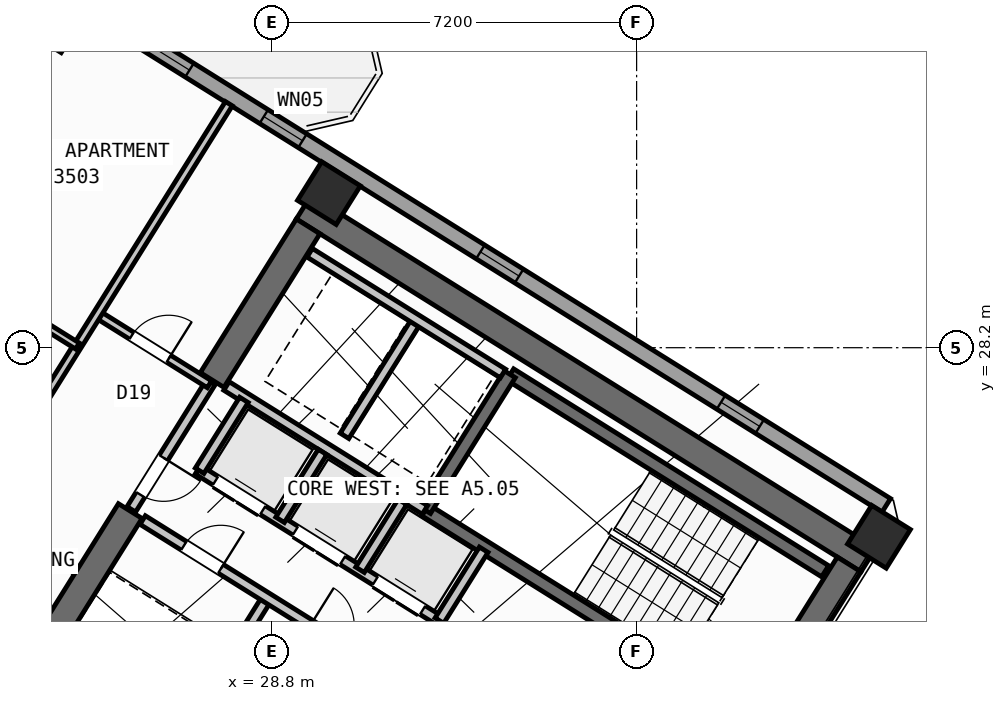
"""IFC4 building model, lengths in metres.
Left out: names, types, materials, properties, quantities, classifications, styles, units other than length and angle.
Written with IfcOpenShell. Run it as: python <this file> out.ifc"""

import sys

from ifc_helpers import new_model, si_unit, direction, frame, frame_2d, origin, origin_2d, place, context, subcontext, project, spatial, rectangle, hollow_rectangle, extrude, source, transform, mapped, element, fill, save


model = new_model("IFC4")
c1 = context("Model", 3, precision=1e-05, world=origin(), true_north=direction((0.0, 1.0)))
c2 = subcontext(c1, "Body", "Model", "MODEL_VIEW")
j1 = project(units=[si_unit("LENGTHUNIT", "METRE"), si_unit("PLANEANGLEUNIT", "RADIAN")], contexts=[c1])
p1 = place(None, origin())
s1 = spatial("IfcSite", under=j1, at=p1, CompositionType="ELEMENT")
p2 = place(p1, origin())
s2 = spatial("IfcBuilding", under=s1, at=p2, CompositionType="ELEMENT")
p3 = place(p2, frame((0.0, 0.0, 140.7)))
s3 = spatial("IfcBuildingStorey", under=s2, at=p3, CompositionType="ELEMENT", Elevation=140.7)
p4 = place(p3, frame((40.573, 24.01, 0.0), z_axis=(0.0, 0.0, 1.0), x_axis=(-0.848047359947, 0.529920442413, 0.0)))
e1 = element("IfcWall", 1, at=p4, inside=s3, PredefinedType="SHEAR", context=c2, shape_type="SweptSolid", body=[
    extrude(rectangle(XDim=13.14, YDim=0.55, at=frame_2d((6.57, 0.0))), origin(), (0.0, 0.0, 1.0), 3.35),
])
p5 = place(p3, frame((40.194, 23.922, 0.0), z_axis=(0.0, 0.0, 1.0), x_axis=(-0.529888438328, -0.848067357541, 0.0)))
e2 = element("IfcWall", 2, at=p5, inside=s3, PredefinedType="SHEAR", context=c2, shape_type="SweptSolid", body=[
    extrude(rectangle(XDim=3.575, YDim=0.55, at=frame_2d((1.788, 0.0))), origin(), (0.0, 0.0, 1.0), 3.35),
])
p6 = place(p3, frame((29.517, 30.594, 0.0), z_axis=(0.0, 0.0, 1.0), x_axis=(-0.529906864564, -0.848055844204, 0.0)))
e3 = element("IfcWall", 3, at=p6, inside=s3, PredefinedType="SHEAR", context=c2, shape_type="SweptSolid", body=[
    extrude(rectangle(XDim=3.575, YDim=0.55, at=frame_2d((1.788, 0.0))), origin(), (0.0, 0.0, 1.0), 3.35),
])
p7 = place(p3, frame((26.007, 24.976, 0.0), z_axis=(0.0, 0.0, 1.0), x_axis=(-0.529923795287, -0.848045264823, 0.0)))
e4 = element("IfcWall", 4, at=p7, inside=s3, PredefinedType="SHEAR", context=c2, shape_type="SweptSolid", body=[
    extrude(rectangle(XDim=6.425, YDim=0.55, at=frame_2d((3.212, 0.0))), origin(), (0.0, 0.0, 1.0), 3.35),
])
m1 = source(origin(), c2, "Body", "SweptSolid", [
    extrude(hollow_rectangle(XDim=0.9, YDim=0.9, WallThickness=0.036, at=origin_2d()), origin(), (0.0, 0.0, 1.0), 3.6),
])
for number, where, z_axis, x_axis in (
    (5, (40.783, 24.469, 0.0), (0.0, 0.0, 1.0), (-0.848, 0.53, 0.0)),
    (6, (29.928, 31.251, 0.0), (0.0, 0.0, 1.0), (-0.848, 0.53, 0.0)),
    (7, (24.5, 34.643, 0.0), (0.0, 0.0, 1.0), (-0.848, 0.53, 0.0)),
):
    element("IfcColumn", number, at=place(p3, frame(where, z_axis=z_axis, x_axis=x_axis)), inside=s3, PredefinedType="COLUMN", context=c2, shape_type="MappedRepresentation", body=[
        mapped(m1, transform((0.0, 0.0, 0.0), scale=1.0)),
    ])
p8 = place(p3, frame((29.268, 6.429, 0.0), z_axis=(0.0, 0.0, 1.0), x_axis=(-0.848049971435, 0.529916263149, 0.0)))
e8 = element("IfcWall", 8, at=p8, inside=s3, PredefinedType="STANDARD", context=c2, shape_type="SweptSolid", body=[
    extrude(rectangle(XDim=31.588, YDim=0.32, at=frame_2d((15.794, 0.0))), origin(), (0.0, 0.0, 1.0), 3.35),
])
p9 = place(p8, frame((16.362, 0.0, 0.0)))
e9 = element("IfcOpeningElement", 9, at=p9, cuts=e8, PredefinedType="OPENING", context=c2, shape_type="SweptSolid", body=[
    extrude(rectangle(XDim=1.2, YDim=2.15, at=frame_2d((0.6, 1.075))), frame((0.0, 0.17, 0.0), z_axis=(0.0, -1.0, 0.0), x_axis=(1.0, 0.0, 0.0)), (0.0, 0.0, 1.0), 0.34),
])
p10 = place(p8, frame((2.989, 0.0, 0.8)))
e10 = element("IfcOpeningElement", 10, at=p10, cuts=e8, PredefinedType="OPENING", context=c2, shape_type="SweptSolid", body=[
    extrude(rectangle(XDim=2.1, YDim=1.55, at=frame_2d((1.05, 0.775))), frame((0.0, 0.17, 0.0), z_axis=(0.0, -1.0, 0.0), x_axis=(1.0, 0.0, 0.0)), (0.0, 0.0, 1.0), 0.34),
])
p11 = place(p8, frame((8.359, 0.0, 0.8)))
e11 = element("IfcOpeningElement", 11, at=p11, cuts=e8, PredefinedType="OPENING", context=c2, shape_type="SweptSolid", body=[
    extrude(rectangle(XDim=2.1, YDim=1.55, at=frame_2d((1.05, 0.775))), frame((0.0, 0.17, 0.0), z_axis=(0.0, -1.0, 0.0), x_axis=(1.0, 0.0, 0.0)), (0.0, 0.0, 1.0), 0.34),
])
p12 = place(p8, frame((13.284, 0.0, 0.95)))
e12 = element("IfcOpeningElement", 12, at=p12, cuts=e8, PredefinedType="OPENING", context=c2, shape_type="SweptSolid", body=[
    extrude(rectangle(XDim=1.2, YDim=1.4, at=frame_2d((0.6, 0.7))), frame((0.0, 0.17, 0.0), z_axis=(0.0, -1.0, 0.0), x_axis=(1.0, 0.0, 0.0)), (0.0, 0.0, 1.0), 0.34),
])
p13 = place(p8, frame((29.188, 0.0, 0.95)))
e13 = element("IfcOpeningElement", 13, at=p13, cuts=e8, PredefinedType="OPENING", context=c2, shape_type="SweptSolid", body=[
    extrude(rectangle(XDim=1.2, YDim=1.4, at=frame_2d((0.6, 0.7))), frame((0.0, 0.17, 0.0), z_axis=(0.0, -1.0, 0.0), x_axis=(1.0, 0.0, 0.0)), (0.0, 0.0, 1.0), 0.34),
])
p14 = place(p8, frame((19.674, 0.0, 1.0)))
e14 = element("IfcOpeningElement", 14, at=p14, cuts=e8, PredefinedType="OPENING", context=c2, shape_type="SweptSolid", body=[
    extrude(rectangle(XDim=0.9, YDim=1.25, at=frame_2d((0.45, 0.625))), frame((0.0, 0.17, 0.0), z_axis=(0.0, -1.0, 0.0), x_axis=(1.0, 0.0, 0.0)), (0.0, 0.0, 1.0), 0.34),
])
p15 = place(p8, frame((21.896, 0.0, 1.0)))
e15 = element("IfcOpeningElement", 15, at=p15, cuts=e8, PredefinedType="OPENING", context=c2, shape_type="SweptSolid", body=[
    extrude(rectangle(XDim=0.9, YDim=1.25, at=frame_2d((0.45, 0.625))), frame((0.0, 0.17, 0.0), z_axis=(0.0, -1.0, 0.0), x_axis=(1.0, 0.0, 0.0)), (0.0, 0.0, 1.0), 0.34),
])
p16 = place(p8, frame((24.106, 0.0, 1.0)))
e16 = element("IfcOpeningElement", 16, at=p16, cuts=e8, PredefinedType="OPENING", context=c2, shape_type="SweptSolid", body=[
    extrude(rectangle(XDim=0.65, YDim=1.15, at=frame_2d((0.325, 0.575))), frame((0.0, 0.17, 0.0), z_axis=(0.0, -1.0, 0.0), x_axis=(1.0, 0.0, 0.0)), (0.0, 0.0, 1.0), 0.34),
])
p17 = place(p8, frame((26.366, 0.0, 1.0)))
e17 = element("IfcOpeningElement", 17, at=p17, cuts=e8, PredefinedType="OPENING", context=c2, shape_type="SweptSolid", body=[
    extrude(rectangle(XDim=0.9, YDim=1.25, at=frame_2d((0.45, 0.625))), frame((0.0, 0.17, 0.0), z_axis=(0.0, -1.0, 0.0), x_axis=(1.0, 0.0, 0.0)), (0.0, 0.0, 1.0), 0.34),
])
p18 = place(p3, frame((14.138, 41.825, 0.0), z_axis=(0.0, 0.0, 1.0), x_axis=(0.848046498049, -0.529921821731, 0.0)))
e18 = element("IfcWall", 18, at=p18, inside=s3, PredefinedType="STANDARD", context=c2, shape_type="SweptSolid", body=[
    extrude(rectangle(XDim=31.588, YDim=0.32, at=frame_2d((15.794, 0.0))), origin(), (0.0, 0.0, 1.0), 3.35),
])
p19 = place(p18, frame((2.949, 0.0, 0.0)))
e19 = element("IfcOpeningElement", 19, at=p19, cuts=e18, PredefinedType="OPENING", context=c2, shape_type="SweptSolid", body=[
    extrude(rectangle(XDim=1.05, YDim=2.15, at=frame_2d((0.525, 1.075))), frame((0.0, 0.17, 0.0), z_axis=(0.0, -1.0, 0.0), x_axis=(1.0, 0.0, 0.0)), (0.0, 0.0, 1.0), 0.34),
])
p20 = place(p18, frame((0.861, 0.0, 0.85)))
e20 = element("IfcOpeningElement", 20, at=p20, cuts=e18, PredefinedType="OPENING", context=c2, shape_type="SweptSolid", body=[
    extrude(rectangle(XDim=1.5, YDim=1.5, at=frame_2d((0.75, 0.75))), frame((0.0, 0.17, 0.0), z_axis=(0.0, -1.0, 0.0), x_axis=(1.0, 0.0, 0.0)), (0.0, 0.0, 1.0), 0.34),
])
p21 = place(p18, frame((8.494, 0.0, 0.85)))
e21 = element("IfcOpeningElement", 21, at=p21, cuts=e18, PredefinedType="OPENING", context=c2, shape_type="SweptSolid", body=[
    extrude(rectangle(XDim=1.8, YDim=1.5, at=frame_2d((0.9, 0.75))), frame((0.0, 0.17, 0.0), z_axis=(0.0, -1.0, 0.0), x_axis=(1.0, 0.0, 0.0)), (0.0, 0.0, 1.0), 0.34),
])
p22 = place(p18, frame((13.874, 0.0, 0.85)))
e22 = element("IfcOpeningElement", 22, at=p22, cuts=e18, PredefinedType="OPENING", context=c2, shape_type="SweptSolid", body=[
    extrude(rectangle(XDim=1.5, YDim=1.5, at=frame_2d((0.75, 0.75))), frame((0.0, 0.17, 0.0), z_axis=(0.0, -1.0, 0.0), x_axis=(1.0, 0.0, 0.0)), (0.0, 0.0, 1.0), 0.34),
])
p23 = place(p18, frame((17.104, 0.0, 1.0)))
e23 = element("IfcOpeningElement", 23, at=p23, cuts=e18, PredefinedType="OPENING", context=c2, shape_type="SweptSolid", body=[
    extrude(rectangle(XDim=0.9, YDim=1.25, at=frame_2d((0.45, 0.625))), frame((0.0, 0.17, 0.0), z_axis=(0.0, -1.0, 0.0), x_axis=(1.0, 0.0, 0.0)), (0.0, 0.0, 1.0), 0.34),
])
p24 = place(p18, frame((22.144, 0.0, 1.0)))
e24 = element("IfcOpeningElement", 24, at=p24, cuts=e18, PredefinedType="OPENING", context=c2, shape_type="SweptSolid", body=[
    extrude(rectangle(XDim=0.9, YDim=1.25, at=frame_2d((0.45, 0.625))), frame((0.0, 0.17, 0.0), z_axis=(0.0, -1.0, 0.0), x_axis=(1.0, 0.0, 0.0)), (0.0, 0.0, 1.0), 0.34),
])
p25 = place(p18, frame((27.744, 0.0, 1.0)))
e25 = element("IfcOpeningElement", 25, at=p25, cuts=e18, PredefinedType="OPENING", context=c2, shape_type="SweptSolid", body=[
    extrude(rectangle(XDim=0.9, YDim=1.25, at=frame_2d((0.45, 0.625))), frame((0.0, 0.17, 0.0), z_axis=(0.0, -1.0, 0.0), x_axis=(1.0, 0.0, 0.0)), (0.0, 0.0, 1.0), 0.34),
])
p26 = place(p3, frame((39.721, 23.788, 0.0), z_axis=(0.0, 0.0, 1.0), x_axis=(-0.848054434086, 0.529909121291, 0.0)))
e26 = element("IfcWall", 26, at=p26, inside=s3, PredefinedType="SHEAR", context=c2, shape_type="SweptSolid", body=[
    extrude(rectangle(XDim=7.33, YDim=0.26, at=frame_2d((3.665, 0.0))), origin(), (0.0, 0.0, 1.0), 3.35),
])
p27 = place(p3, frame((38.046, 21.108, 0.0), z_axis=(0.0, 0.0, 1.0), x_axis=(-0.848054434086, 0.529909121291, 0.0)))
e27 = element("IfcWall", 27, at=p27, inside=s3, PredefinedType="SHEAR", context=c2, shape_type="SweptSolid", body=[
    extrude(rectangle(XDim=7.33, YDim=0.26, at=frame_2d((3.665, 0.0))), origin(), (0.0, 0.0, 1.0), 3.35),
])
p28 = place(p27, frame((0.22, 0.0, 0.0)))
e28 = element("IfcOpeningElement", 28, at=p28, cuts=e27, PredefinedType="OPENING", context=c2, shape_type="SweptSolid", body=[
    extrude(rectangle(XDim=1.1, YDim=2.1, at=frame_2d((0.55, 1.05))), frame((0.0, 0.14, 0.0), z_axis=(0.0, -1.0, 0.0), x_axis=(1.0, 0.0, 0.0)), (0.0, 0.0, 1.0), 0.28),
])
p29 = place(p3, frame((33.496, 27.677, 0.0), z_axis=(0.0, 0.0, 1.0), x_axis=(-0.529908658664, -0.84805472316, 0.0)))
e29 = element("IfcWall", 29, at=p29, inside=s3, PredefinedType="SHEAR", context=c2, shape_type="SweptSolid", body=[
    extrude(rectangle(XDim=3.16, YDim=0.26, at=frame_2d((1.58, 0.0))), origin(), (0.0, 0.0, 1.0), 3.35),
])
p30 = place(p3, frame((31.822, 24.998, 0.0), z_axis=(0.0, 0.0, 1.0), x_axis=(-0.848036912365, 0.52993716162, 0.0)))
e30 = element("IfcWall", 30, at=p30, inside=s3, PredefinedType="STANDARD", context=c2, shape_type="SweptSolid", body=[
    extrude(rectangle(XDim=4.618, YDim=0.2, at=frame_2d((2.309, 0.0))), origin(), (0.0, 0.0, 1.0), 3.34),
])
p31 = place(p3, frame((32.108, 22.814, 0.0), z_axis=(0.0, 0.0, 1.0), x_axis=(-0.848042229521, 0.529928652696, 0.0)))
e31 = element("IfcWall", 31, at=p31, inside=s3, PredefinedType="STANDARD", context=c2, shape_type="SweptSolid", body=[
    extrude(rectangle(XDim=5.62, YDim=0.2, at=frame_2d((2.81, 0.0))), origin(), (0.0, 0.0, 1.0), 3.34),
])
p32 = place(p31, frame((0.39, 0.0, 0.0)))
e32 = element("IfcOpeningElement", 32, at=p32, cuts=e31, PredefinedType="OPENING", context=c2, shape_type="SweptSolid", body=[
    extrude(rectangle(XDim=1.1, YDim=2.15, at=frame_2d((0.55, 1.075))), frame((0.0, 0.11, 0.0), z_axis=(0.0, -1.0, 0.0), x_axis=(1.0, 0.0, 0.0)), (0.0, 0.0, 1.0), 0.22),
])
p33 = place(p31, frame((2.25, 0.0, 0.0)))
e33 = element("IfcOpeningElement", 33, at=p33, cuts=e31, PredefinedType="OPENING", context=c2, shape_type="SweptSolid", body=[
    extrude(rectangle(XDim=1.1, YDim=2.15, at=frame_2d((0.55, 1.075))), frame((0.0, 0.11, 0.0), z_axis=(0.0, -1.0, 0.0), x_axis=(1.0, 0.0, 0.0)), (0.0, 0.0, 1.0), 0.22),
])
p34 = place(p31, frame((4.11, 0.0, 0.0)))
e34 = element("IfcOpeningElement", 34, at=p34, cuts=e31, PredefinedType="OPENING", context=c2, shape_type="SweptSolid", body=[
    extrude(rectangle(XDim=1.1, YDim=2.15, at=frame_2d((0.55, 1.075))), frame((0.0, 0.11, 0.0), z_axis=(0.0, -1.0, 0.0), x_axis=(1.0, 0.0, 0.0)), (0.0, 0.0, 1.0), 0.22),
])
p35 = place(p3, frame((32.982, 24.213, 0.0), z_axis=(0.0, 0.0, 1.0), x_axis=(-0.529839334948, -0.84809803628, 0.0)))
e35 = element("IfcWall", 35, at=p35, inside=s3, PredefinedType="STANDARD", context=c2, shape_type="SweptSolid", body=[
    extrude(rectangle(XDim=1.65, YDim=0.2, at=frame_2d((0.825, 0.0))), origin(), (0.0, 0.0, 1.0), 3.34),
])
p36 = place(p3, frame((28.25, 27.17, 0.0), z_axis=(0.0, 0.0, 1.0), x_axis=(-0.529905827651, -0.848056492117, 0.0)))
e36 = element("IfcWall", 36, at=p36, inside=s3, PredefinedType="STANDARD", context=c2, shape_type="SweptSolid", body=[
    extrude(rectangle(XDim=1.65, YDim=0.2, at=frame_2d((0.825, 0.0))), origin(), (0.0, 0.0, 1.0), 3.34),
])
p37 = place(p3, frame((31.645, 28.716, 0.0), z_axis=(0.0, 0.0, 1.0), x_axis=(-0.52986693015, -0.848080795876, 0.0)))
e37 = element("IfcWall", 37, at=p37, inside=s3, PredefinedType="STANDARD", context=c2, shape_type="SweptSolid", body=[
    extrude(rectangle(XDim=2.66, YDim=0.2, at=frame_2d((1.33, 0.0))), origin(), (0.0, 0.0, 1.0), 3.34),
])
p38 = place(p3, frame((33.363, 27.69, 0.0), z_axis=(0.0, 0.0, 1.0), x_axis=(-0.848047090064, 0.529920874315, 0.0)))
e38 = element("IfcWall", 38, at=p38, inside=s3, PredefinedType="STANDARD", context=c2, shape_type="SweptSolid", body=[
    extrude(rectangle(XDim=4.498, YDim=0.2, at=frame_2d((2.249, 0.0))), origin(), (0.0, 0.0, 1.0), 3.34),
])
for number, where, z_axis, x_axis in (
    (39, (31.379, 25.156, 0.0), (0.0, 0.0, 1.0), (-0.53, -0.848, 0.0)),
    (40, (29.801, 26.142, 0.0), (0.0, 0.0, 1.0), (-0.53, -0.848, 0.0)),
):
    element("IfcWall", number, at=place(p3, frame(where, z_axis=z_axis, x_axis=x_axis)), inside=s3, PredefinedType="STANDARD", context=c2, shape_type="SweptSolid", body=[
        extrude(rectangle(XDim=1.58, YDim=0.2, at=frame_2d((0.79, 0.0))), origin(), (0.0, 0.0, 1.0), 3.34),
    ])
p39 = place(p3, frame((28.71, 23.263, 0.0), z_axis=(0.0, 0.0, 1.0), x_axis=(-0.529907497854, -0.848055448493, 0.0)))
e41 = element("IfcWall", 41, at=p39, inside=s3, PredefinedType="STANDARD", context=c2, shape_type="SweptSolid", body=[
    extrude(rectangle(XDim=2.88, YDim=0.2, at=frame_2d((1.44, 0.0))), origin(), (0.0, 0.0, 1.0), 3.34),
])
p40 = place(p3, frame((31.525, 21.504, 0.0), z_axis=(0.0, 0.0, 1.0), x_axis=(-0.848040211232, 0.529931882541, 0.0)))
e42 = element("IfcWall", 42, at=p40, inside=s3, PredefinedType="STANDARD", context=c2, shape_type="SweptSolid", body=[
    extrude(rectangle(XDim=6.218, YDim=0.2, at=frame_2d((3.109, 0.0))), origin(), (0.0, 0.0, 1.0), 3.34),
])
p41 = place(p40, frame((4.4, 0.0, 0.0)))
e43 = element("IfcOpeningElement", 43, at=p41, cuts=e42, PredefinedType="OPENING", context=c2, shape_type="SweptSolid", body=[
    extrude(rectangle(XDim=0.86, YDim=2.05, at=frame_2d((0.43, 1.025))), frame((0.0, 0.11, 0.0), z_axis=(0.0, -1.0, 0.0), x_axis=(1.0, 0.0, 0.0)), (0.0, 0.0, 1.0), 0.22),
])
p42 = place(p40, frame((1.45, 0.0, 0.0)))
e44 = element("IfcOpeningElement", 44, at=p42, cuts=e42, PredefinedType="OPENING", context=c2, shape_type="SweptSolid", body=[
    extrude(rectangle(XDim=0.86, YDim=2.05, at=frame_2d((0.43, 1.025))), frame((0.0, 0.11, 0.0), z_axis=(0.0, -1.0, 0.0), x_axis=(1.0, 0.0, 0.0)), (0.0, 0.0, 1.0), 0.22),
])
p43 = place(p3, frame((27.596, 27.52, 0.0), z_axis=(0.0, 0.0, 1.0), x_axis=(-0.529865479138, -0.848081702443, 0.0)))
e45 = element("IfcWall", 45, at=p43, inside=s3, PredefinedType="STANDARD", context=c2, shape_type="SweptSolid", body=[
    extrude(rectangle(XDim=2.96, YDim=0.2, at=frame_2d((1.48, 0.0))), origin(), (0.0, 0.0, 1.0), 3.34),
])
p44 = place(p43, frame((1.76, 0.0, 0.0)))
e46 = element("IfcOpeningElement", 46, at=p44, cuts=e45, PredefinedType="OPENING", context=c2, shape_type="SweptSolid", body=[
    extrude(rectangle(XDim=0.86, YDim=2.05, at=frame_2d((0.43, 1.025))), frame((0.0, 0.11, 0.0), z_axis=(0.0, -1.0, 0.0), x_axis=(1.0, 0.0, 0.0)), (0.0, 0.0, 1.0), 0.22),
])
p45 = place(p3, frame((27.57, 27.478, 0.0), z_axis=(0.0, 0.0, 1.0), x_axis=(-0.848050851465, 0.529914854792, 0.0)))
e47 = element("IfcWall", 47, at=p45, inside=s3, PredefinedType="PARTITIONING", context=c2, shape_type="SweptSolid", body=[
    extrude(rectangle(XDim=2.61, YDim=0.16, at=frame_2d((1.305, 0.0))), origin(), (0.0, 0.0, 1.0), 3.34),
])
p46 = place(p45, frame((0.95, 0.0, 0.0)))
e48 = element("IfcOpeningElement", 48, at=p46, cuts=e47, PredefinedType="OPENING", context=c2, shape_type="SweptSolid", body=[
    extrude(rectangle(XDim=0.86, YDim=2.05, at=frame_2d((0.43, 1.025))), frame((0.0, 0.09, 0.0), z_axis=(0.0, -1.0, 0.0), x_axis=(1.0, 0.0, 0.0)), (0.0, 0.0, 1.0), 0.18),
])
p47 = place(p3, frame((27.953, 33.016, 0.0), z_axis=(0.0, 0.0, 1.0), x_axis=(-0.529903001606, -0.848058257957, 0.0)))
e49 = element("IfcWall", 49, at=p47, inside=s3, PredefinedType="PARTITIONING", context=c2, shape_type="SweptSolid", body=[
    extrude(rectangle(XDim=9.15, YDim=0.16, at=frame_2d((4.575, 0.0))), origin(), (0.0, 0.0, 1.0), 3.34),
])
p48 = place(p3, frame((24.964, 28.233, 0.0), z_axis=(0.0, 0.0, 1.0), x_axis=(-0.848059820872, 0.529900500304, 0.0)))
e50 = element("IfcWall", 50, at=p48, inside=s3, PredefinedType="PLUMBINGWALL", context=c2, shape_type="SweptSolid", body=[
    extrude(rectangle(XDim=3.79, YDim=0.14, at=frame_2d((1.895, 0.0))), origin(), (0.0, 0.0, 1.0), 3.34),
])
p49 = place(p48, frame((2.23, 0.0, 0.0)))
e51 = element("IfcOpeningElement", 51, at=p49, cuts=e50, PredefinedType="OPENING", context=c2, shape_type="SweptSolid", body=[
    extrude(rectangle(XDim=0.92, YDim=2.08, at=frame_2d((0.46, 1.04))), frame((0.0, 0.08, 0.0), z_axis=(0.0, -1.0, 0.0), x_axis=(1.0, 0.0, 0.0)), (0.0, 0.0, 1.0), 0.16),
])
m2 = source(origin(), c2, "Body", "SweptSolid", [
    extrude(rectangle(XDim=1.5, YDim=1.5, at=frame_2d((0.75, 0.75))), frame((0.0, 0.03, 0.0), z_axis=(0.0, -1.0, 0.0), x_axis=(1.0, 0.0, 0.0)), (0.0, 0.0, 1.0), 0.06),
])
p50 = place(p22, origin())
e52 = element("IfcWindow", 52, at=p50, inside=s3, PartitioningType="SINGLE_PANEL", PredefinedType="WINDOW", context=c2, shape_type="MappedRepresentation", body=[
    mapped(m2, transform((0.0, 0.0, 0.0), scale=1.0)),
])
fill(e22, e52)
m3 = source(origin(), c2, "Body", "SweptSolid", [
    extrude(rectangle(XDim=0.9, YDim=1.25, at=frame_2d((0.45, 0.625))), frame((0.0, 0.03, 0.0), z_axis=(0.0, -1.0, 0.0), x_axis=(1.0, 0.0, 0.0)), (0.0, 0.0, 1.0), 0.06),
])
p51 = place(p23, origin())
e53 = element("IfcWindow", 53, at=p51, inside=s3, PartitioningType="SINGLE_PANEL", PredefinedType="WINDOW", context=c2, shape_type="MappedRepresentation", body=[
    mapped(m3, transform((0.0, 0.0, 0.0), scale=1.0)),
])
fill(e23, e53)
p52 = place(p24, origin())
e54 = element("IfcWindow", 54, at=p52, inside=s3, PartitioningType="SINGLE_PANEL", PredefinedType="WINDOW", context=c2, shape_type="MappedRepresentation", body=[
    mapped(m3, transform((0.0, 0.0, 0.0), scale=1.0)),
])
fill(e24, e54)
p53 = place(p25, origin())
e55 = element("IfcWindow", 55, at=p53, inside=s3, PartitioningType="SINGLE_PANEL", PredefinedType="WINDOW", context=c2, shape_type="MappedRepresentation", body=[
    mapped(m3, transform((0.0, 0.0, 0.0), scale=1.0)),
])
fill(e25, e55)
m4 = source(origin(), c2, "Body", "SweptSolid", [
    extrude(rectangle(XDim=1.1, YDim=2.15, at=frame_2d((0.55, 1.075))), frame((0.0, 0.025, 0.0), z_axis=(0.0, -1.0, 0.0), x_axis=(1.0, 0.0, 0.0)), (0.0, 0.0, 1.0), 0.05),
])
p54 = place(p32, origin())
e56 = element("IfcDoor", 56, at=p54, inside=s3, OperationType="DOUBLE_DOOR_SLIDING", PredefinedType="DOOR", context=c2, shape_type="MappedRepresentation", body=[
    mapped(m4, transform((0.0, 0.0, 0.0), scale=1.0)),
])
fill(e32, e56)
p55 = place(p33, origin())
e57 = element("IfcDoor", 57, at=p55, inside=s3, OperationType="DOUBLE_DOOR_SLIDING", PredefinedType="DOOR", context=c2, shape_type="MappedRepresentation", body=[
    mapped(m4, transform((0.0, 0.0, 0.0), scale=1.0)),
])
fill(e33, e57)
p56 = place(p34, origin())
e58 = element("IfcDoor", 58, at=p56, inside=s3, OperationType="DOUBLE_DOOR_SLIDING", PredefinedType="DOOR", context=c2, shape_type="MappedRepresentation", body=[
    mapped(m4, transform((0.0, 0.0, 0.0), scale=1.0)),
])
fill(e34, e58)
m5 = source(origin(), c2, "Body", "SweptSolid", [
    extrude(rectangle(XDim=0.86, YDim=2.05, at=frame_2d((0.43, 1.025))), frame((0.0, 0.025, 0.0), z_axis=(0.0, -1.0, 0.0), x_axis=(1.0, 0.0, 0.0)), (0.0, 0.0, 1.0), 0.05),
])
p57 = place(p41, frame((0.86, 0.0, 0.0), z_axis=(0.0, 0.0, 1.0), x_axis=(-1.0, 0.0, 0.0)))
e59 = element("IfcDoor", 59, at=p57, inside=s3, OperationType="SINGLE_SWING_RIGHT", PredefinedType="DOOR", context=c2, shape_type="MappedRepresentation", body=[
    mapped(m5, transform((0.0, 0.0, 0.0), scale=1.0)),
])
fill(e43, e59)
p58 = place(p46, frame((0.86, 0.0, 0.0), z_axis=(0.0, 0.0, 1.0), x_axis=(-1.0, 0.0, 0.0)))
e60 = element("IfcDoor", 60, at=p58, inside=s3, OperationType="SINGLE_SWING_RIGHT", PredefinedType="DOOR", context=c2, shape_type="MappedRepresentation", body=[
    mapped(m5, transform((0.0, 0.0, 0.0), scale=1.0)),
])
fill(e48, e60)
p59 = place(p44, origin())
e61 = element("IfcDoor", 61, at=p59, inside=s3, OperationType="SINGLE_SWING_LEFT", PredefinedType="DOOR", context=c2, shape_type="MappedRepresentation", body=[
    mapped(m5, transform((0.0, 0.0, 0.0), scale=1.0)),
])
fill(e46, e61)
save(model, sys.argv[1])
